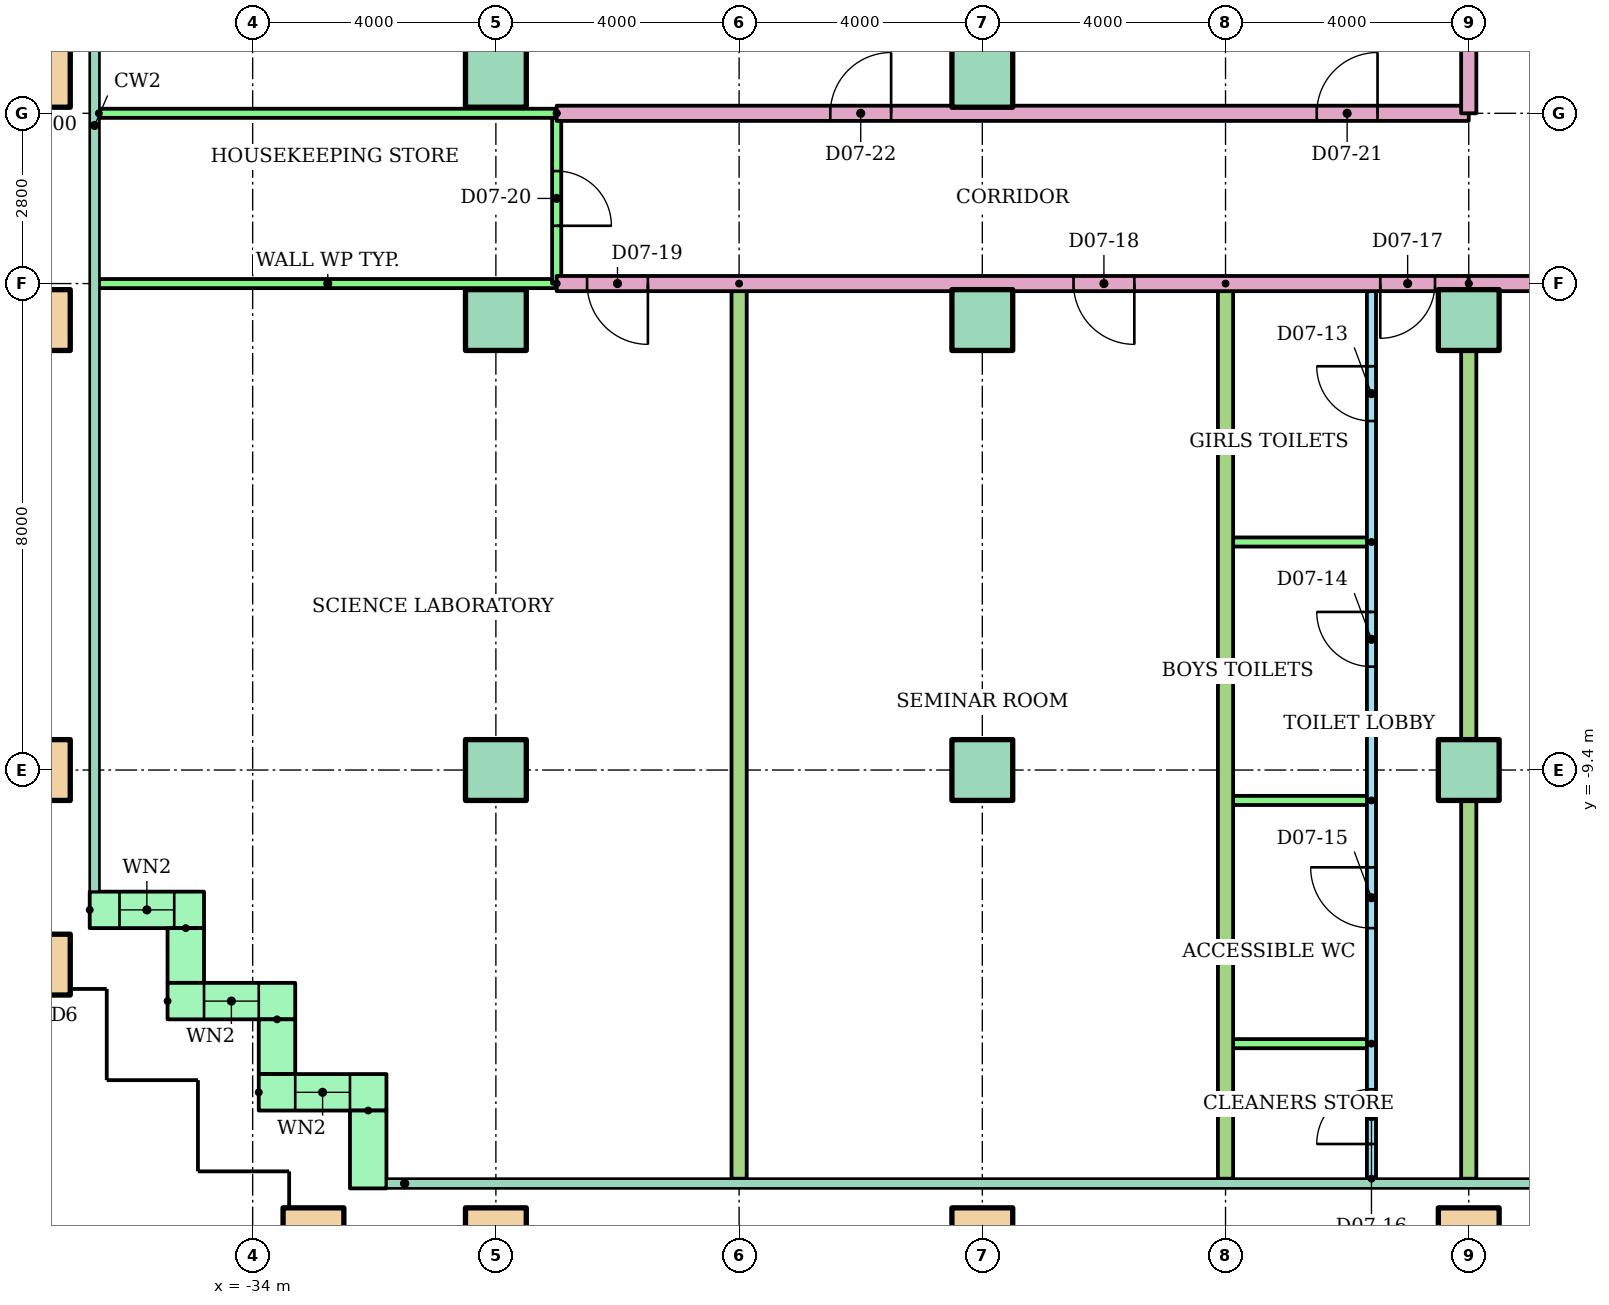
"""IFC4 building model, lengths in metres.
Left out: names, types, materials, properties, quantities, classifications, styles, units other than length and angle.
Written with IfcOpenShell. Run it as: python <this file> out.ifc"""

import sys

from ifc_helpers import new_model, si_unit, direction, frame, frame_2d, origin, origin_2d, place, context, subcontext, project, spatial, rectangle, hollow_rectangle, extrude, element, fill, save


model = new_model("IFC4")
c1 = context("Model", 3, precision=1e-05, world=origin(), true_north=direction((0.0, 1.0)))
c2 = subcontext(c1, "Body", "Model", "MODEL_VIEW")
j1 = project(units=[si_unit("LENGTHUNIT", "METRE"), si_unit("PLANEANGLEUNIT", "RADIAN")], contexts=[c1])
p1 = place(None, origin())
s1 = spatial("IfcSite", under=j1, at=p1, CompositionType="ELEMENT")
p2 = place(p1, origin())
s2 = spatial("IfcBuilding", under=s1, at=p2, CompositionType="ELEMENT")
p3 = place(p2, frame((0.0, 0.0, 29.9)))
s3 = spatial("IfcBuildingStorey", under=s2, at=p3, CompositionType="ELEMENT", Elevation=29.9)
for number, where in (
    (1, (-33.0, -17.1, 0.0)),
    (2, (-30.0, -17.1, 0.0)),
    (3, (-22.0, -17.1, 0.0)),
    (4, (-14.0, -17.1, 0.0)),
    (5, (-37.5, -12.6, 0.0)),
    (6, (-37.5, -9.4, 0.0)),
):
    element("IfcColumn", number, at=place(p3, frame(where)), inside=s3, PredefinedType="COLUMN", context=c2, shape_type="SweptSolid", body=[
        extrude(hollow_rectangle(XDim=1.0, YDim=1.0, WallThickness=0.05, at=origin_2d()), origin(), (0.0, 0.0, 1.0), 3.9),
    ])
for number, where in (
    (7, (-30.0, -9.4, 0.0)),
    (8, (-22.0, -9.4, 0.0)),
    (9, (-14.0, -9.4, 0.0)),
):
    element("IfcColumn", number, at=place(p3, frame(where)), inside=s3, PredefinedType="COLUMN", context=c2, shape_type="SweptSolid", body=[
        extrude(rectangle(XDim=1.0, YDim=1.0, at=origin_2d()), origin(), (0.0, 0.0, 1.0), 3.9),
    ])
p4 = place(p3, frame((-37.5, -2.0, 0.0)))
e10 = element("IfcColumn", 10, at=p4, inside=s3, PredefinedType="COLUMN", context=c2, shape_type="SweptSolid", body=[
    extrude(hollow_rectangle(XDim=1.0, YDim=1.0, WallThickness=0.05, at=origin_2d()), origin(), (0.0, 0.0, 1.0), 3.9),
])
for number, where in (
    (11, (-30.0, -2.0, 0.0)),
    (12, (-22.0, -2.0, 0.0)),
    (13, (-14.0, -2.0, 0.0)),
):
    element("IfcColumn", number, at=place(p3, frame(where)), inside=s3, PredefinedType="COLUMN", context=c2, shape_type="SweptSolid", body=[
        extrude(rectangle(XDim=1.0, YDim=1.0, at=origin_2d()), origin(), (0.0, 0.0, 1.0), 3.9),
    ])
p5 = place(p3, frame((-37.5, 2.0, 0.0)))
e14 = element("IfcColumn", 14, at=p5, inside=s3, PredefinedType="COLUMN", context=c2, shape_type="SweptSolid", body=[
    extrude(hollow_rectangle(XDim=1.0, YDim=1.0, WallThickness=0.05, at=origin_2d()), origin(), (0.0, 0.0, 1.0), 3.9),
])
for number, where in (
    (15, (-30.0, 2.0, 0.0)),
    (16, (-22.0, 2.0, 0.0)),
):
    element("IfcColumn", number, at=place(p3, frame(where)), inside=s3, PredefinedType="COLUMN", context=c2, shape_type="SweptSolid", body=[
        extrude(rectangle(XDim=1.0, YDim=1.0, at=origin_2d()), origin(), (0.0, 0.0, 1.0), 3.9),
    ])
p6 = place(p3, frame((-36.68, -11.7, 0.0)))
e17 = element("IfcWall", 17, at=p6, inside=s3, PredefinedType="STANDARD", context=c2, shape_type="SweptSolid", body=[
    extrude(rectangle(XDim=1.88, YDim=0.6, at=frame_2d((0.94, 0.0))), origin(), (0.0, 0.0, 1.0), 3.6),
])
p7 = place(p6, frame((0.49, 0.0, 0.9)))
e18 = element("IfcOpeningElement", 18, at=p7, cuts=e17, PredefinedType="OPENING", context=c2, shape_type="SweptSolid", body=[
    extrude(rectangle(XDim=0.9, YDim=1.8, at=frame_2d((0.45, 0.9))), frame((0.0, 0.31, 0.0), z_axis=(0.0, -1.0, 0.0), x_axis=(1.0, 0.0, 0.0)), (0.0, 0.0, 1.0), 0.62),
])
p8 = place(p3, frame((-35.1, -12.0, 0.0), z_axis=(0.0, 0.0, 1.0), x_axis=(0.0, -1.0, 0.0)))
e19 = element("IfcWall", 19, at=p8, inside=s3, PredefinedType="STANDARD", context=c2, shape_type="SweptSolid", body=[
    extrude(rectangle(XDim=0.9, YDim=0.6, at=frame_2d((0.45, 0.0))), origin(), (0.0, 0.0, 1.0), 3.6),
])
p9 = place(p3, frame((-35.4, -13.2, 0.0)))
e20 = element("IfcWall", 20, at=p9, inside=s3, PredefinedType="STANDARD", context=c2, shape_type="SweptSolid", body=[
    extrude(rectangle(XDim=2.1, YDim=0.6, at=frame_2d((1.05, 0.0))), origin(), (0.0, 0.0, 1.0), 3.6),
])
p10 = place(p9, frame((0.6, 0.0, 0.9)))
e21 = element("IfcOpeningElement", 21, at=p10, cuts=e20, PredefinedType="OPENING", context=c2, shape_type="SweptSolid", body=[
    extrude(rectangle(XDim=0.9, YDim=1.8, at=frame_2d((0.45, 0.9))), frame((0.0, 0.31, 0.0), z_axis=(0.0, -1.0, 0.0), x_axis=(1.0, 0.0, 0.0)), (0.0, 0.0, 1.0), 0.62),
])
p11 = place(p3, frame((-33.6, -13.5, 0.0), z_axis=(0.0, 0.0, 1.0), x_axis=(0.0, -1.0, 0.0)))
e22 = element("IfcWall", 22, at=p11, inside=s3, PredefinedType="STANDARD", context=c2, shape_type="SweptSolid", body=[
    extrude(rectangle(XDim=0.9, YDim=0.6, at=frame_2d((0.45, 0.0))), origin(), (0.0, 0.0, 1.0), 3.6),
])
p12 = place(p3, frame((-33.9, -14.7, 0.0)))
e23 = element("IfcWall", 23, at=p12, inside=s3, PredefinedType="STANDARD", context=c2, shape_type="SweptSolid", body=[
    extrude(rectangle(XDim=2.1, YDim=0.6, at=frame_2d((1.05, 0.0))), origin(), (0.0, 0.0, 1.0), 3.6),
])
p13 = place(p12, frame((0.6, 0.0, 0.9)))
e24 = element("IfcOpeningElement", 24, at=p13, cuts=e23, PredefinedType="OPENING", context=c2, shape_type="SweptSolid", body=[
    extrude(rectangle(XDim=0.9, YDim=1.8, at=frame_2d((0.45, 0.9))), frame((0.0, 0.31, 0.0), z_axis=(0.0, -1.0, 0.0), x_axis=(1.0, 0.0, 0.0)), (0.0, 0.0, 1.0), 0.62),
])
p14 = place(p3, frame((-32.1, -15.0, 0.0), z_axis=(0.0, 0.0, 1.0), x_axis=(0.0, -1.0, 0.0)))
e25 = element("IfcWall", 25, at=p14, inside=s3, PredefinedType="STANDARD", context=c2, shape_type="SweptSolid", body=[
    extrude(rectangle(XDim=1.28, YDim=0.6, at=frame_2d((0.64, 0.0))), origin(), (0.0, 0.0, 1.0), 3.6),
])
p15 = place(p3, frame((-14.0, -1.4, 0.0), z_axis=(0.0, 0.0, 1.0), x_axis=(-1.0, 0.0, 0.0)))
e26 = element("IfcWall", 26, at=p15, inside=s3, PredefinedType="PARTITIONING", context=c2, shape_type="SweptSolid", body=[
    extrude(rectangle(XDim=15.0, YDim=0.25, at=frame_2d((7.5, 0.0))), origin(), (0.0, 0.0, 1.0), 3.1),
])
p16 = place(p15, frame((0.555, 0.0, 0.0)))
e27 = element("IfcOpeningElement", 27, at=p16, cuts=e26, PredefinedType="OPENING", context=c2, shape_type="SweptSolid", body=[
    extrude(rectangle(XDim=0.9, YDim=2.1, at=frame_2d((0.45, 1.05))), frame((0.0, 0.135, 0.0), z_axis=(0.0, -1.0, 0.0), x_axis=(1.0, 0.0, 0.0)), (0.0, 0.0, 1.0), 0.27),
])
p17 = place(p15, frame((5.5, 0.0, 0.0)))
e28 = element("IfcOpeningElement", 28, at=p17, cuts=e26, PredefinedType="OPENING", context=c2, shape_type="SweptSolid", body=[
    extrude(rectangle(XDim=1.0, YDim=2.1, at=frame_2d((0.5, 1.05))), frame((0.0, 0.135, 0.0), z_axis=(0.0, -1.0, 0.0), x_axis=(1.0, 0.0, 0.0)), (0.0, 0.0, 1.0), 0.27),
])
p18 = place(p15, frame((13.5, 0.0, 0.0)))
e29 = element("IfcOpeningElement", 29, at=p18, cuts=e26, PredefinedType="OPENING", context=c2, shape_type="SweptSolid", body=[
    extrude(rectangle(XDim=1.0, YDim=2.1, at=frame_2d((0.5, 1.05))), frame((0.0, 0.135, 0.0), z_axis=(0.0, -1.0, 0.0), x_axis=(1.0, 0.0, 0.0)), (0.0, 0.0, 1.0), 0.27),
])
p19 = place(p3, frame((-29.0, -1.4, 0.0), z_axis=(0.0, 0.0, 1.0), x_axis=(-1.0, 0.0, 0.0)))
e30 = element("IfcWall", 30, at=p19, inside=s3, PredefinedType="PARTITIONING", context=c2, shape_type="SweptSolid", body=[
    extrude(rectangle(XDim=7.53, YDim=0.15, at=frame_2d((3.765, 0.0))), origin(), (0.0, 0.0, 1.0), 3.1),
])
p20 = place(p3, frame((-29.0, 1.4, 0.0), z_axis=(0.0, 0.0, 1.0), x_axis=(0.0, -1.0, 0.0)))
e31 = element("IfcWall", 31, at=p20, inside=s3, PredefinedType="PARTITIONING", context=c2, shape_type="SweptSolid", body=[
    extrude(rectangle(XDim=2.8, YDim=0.15, at=frame_2d((1.4, 0.0))), origin(), (0.0, 0.0, 1.0), 3.1),
])
p21 = place(p20, frame((0.95, 0.0, 0.0)))
e32 = element("IfcOpeningElement", 32, at=p21, cuts=e31, PredefinedType="OPENING", context=c2, shape_type="SweptSolid", body=[
    extrude(rectangle(XDim=0.9, YDim=2.1, at=frame_2d((0.45, 1.05))), frame((0.0, 0.085, 0.0), z_axis=(0.0, -1.0, 0.0), x_axis=(1.0, 0.0, 0.0)), (0.0, 0.0, 1.0), 0.17),
])
p22 = place(p3, frame((-15.6, -16.121, 0.0), z_axis=(0.0, 0.0, 1.0), x_axis=(0.0, 1.0, 0.0)))
e33 = element("IfcWall", 33, at=p22, inside=s3, PredefinedType="PARTITIONING", context=c2, shape_type="SweptSolid", body=[
    extrude(rectangle(XDim=14.721, YDim=0.15, at=frame_2d((7.361, 0.0))), origin(), (0.0, 0.0, 1.0), 3.1),
])
p23 = place(p22, frame((12.461, 0.0, 0.0)))
e34 = element("IfcOpeningElement", 34, at=p23, cuts=e33, PredefinedType="OPENING", context=c2, shape_type="SweptSolid", body=[
    extrude(rectangle(XDim=0.9, YDim=2.1, at=frame_2d((0.45, 1.05))), frame((0.0, 0.085, 0.0), z_axis=(0.0, -1.0, 0.0), x_axis=(1.0, 0.0, 0.0)), (0.0, 0.0, 1.0), 0.17),
])
p24 = place(p22, frame((8.421, 0.0, 0.0)))
e35 = element("IfcOpeningElement", 35, at=p24, cuts=e33, PredefinedType="OPENING", context=c2, shape_type="SweptSolid", body=[
    extrude(rectangle(XDim=0.9, YDim=2.1, at=frame_2d((0.45, 1.05))), frame((0.0, 0.085, 0.0), z_axis=(0.0, -1.0, 0.0), x_axis=(1.0, 0.0, 0.0)), (0.0, 0.0, 1.0), 0.17),
])
p25 = place(p22, frame((4.121, 0.0, 0.0)))
e36 = element("IfcOpeningElement", 36, at=p25, cuts=e33, PredefinedType="OPENING", context=c2, shape_type="SweptSolid", body=[
    extrude(rectangle(XDim=1.0, YDim=2.1, at=frame_2d((0.5, 1.05))), frame((0.0, 0.085, 0.0), z_axis=(0.0, -1.0, 0.0), x_axis=(1.0, 0.0, 0.0)), (0.0, 0.0, 1.0), 0.17),
])
p26 = place(p22, frame((0.571, 0.0, 0.0)))
e37 = element("IfcOpeningElement", 37, at=p26, cuts=e33, PredefinedType="OPENING", context=c2, shape_type="SweptSolid", body=[
    extrude(rectangle(XDim=0.9, YDim=2.1, at=frame_2d((0.45, 1.05))), frame((0.0, 0.085, 0.0), z_axis=(0.0, -1.0, 0.0), x_axis=(1.0, 0.0, 0.0)), (0.0, 0.0, 1.0), 0.17),
])
for number, where, z_axis, x_axis in (
    (38, (-15.6, -5.65, 0.0), (0.0, 0.0, 1.0), (-1.0, 0.0, 0.0)),
    (39, (-15.6, -9.9, 0.0), (0.0, 0.0, 1.0), (-1.0, 0.0, 0.0)),
    (40, (-15.6, -13.9, 0.0), (0.0, 0.0, 1.0), (-1.0, 0.0, 0.0)),
):
    element("IfcWall", number, at=place(p3, frame(where, z_axis=z_axis, x_axis=x_axis)), inside=s3, PredefinedType="PARTITIONING", context=c2, shape_type="SweptSolid", body=[
        extrude(rectangle(XDim=2.4, YDim=0.15, at=frame_2d((1.2, 0.0))), origin(), (0.0, 0.0, 1.0), 3.1),
    ])
for number, where, z_axis, x_axis in (
    (41, (-26.0, -1.4, 0.0), (0.0, 0.0, 1.0), (0.0, -1.0, 0.0)),
    (42, (-18.0, -1.4, 0.0), (0.0, 0.0, 1.0), (0.0, -1.0, 0.0)),
    (43, (-14.0, -1.4, 0.0), (0.0, 0.0, 1.0), (0.0, -1.0, 0.0)),
):
    element("IfcWall", number, at=place(p3, frame(where, z_axis=z_axis, x_axis=x_axis)), inside=s3, PredefinedType="PARTITIONING", context=c2, shape_type="SweptSolid", body=[
        extrude(rectangle(XDim=14.721, YDim=0.25, at=frame_2d((7.361, 0.0))), origin(), (0.0, 0.0, 1.0), 3.1),
    ])
p27 = place(p3, frame((-29.0, 1.4, 0.0)))
e44 = element("IfcWall", 44, at=p27, inside=s3, PredefinedType="PARTITIONING", context=c2, shape_type="SweptSolid", body=[
    extrude(rectangle(XDim=15.0, YDim=0.25, at=frame_2d((7.5, 0.0))), origin(), (0.0, 0.0, 1.0), 3.1),
])
p28 = place(p27, frame((12.5, 0.0, 0.0)))
e45 = element("IfcOpeningElement", 45, at=p28, cuts=e44, PredefinedType="OPENING", context=c2, shape_type="SweptSolid", body=[
    extrude(rectangle(XDim=1.0, YDim=2.1, at=frame_2d((0.5, 1.05))), frame((0.0, 0.135, 0.0), z_axis=(0.0, -1.0, 0.0), x_axis=(1.0, 0.0, 0.0)), (0.0, 0.0, 1.0), 0.27),
])
p29 = place(p27, frame((4.5, 0.0, 0.0)))
e46 = element("IfcOpeningElement", 46, at=p29, cuts=e44, PredefinedType="OPENING", context=c2, shape_type="SweptSolid", body=[
    extrude(rectangle(XDim=1.0, YDim=2.1, at=frame_2d((0.5, 1.05))), frame((0.0, 0.135, 0.0), z_axis=(0.0, -1.0, 0.0), x_axis=(1.0, 0.0, 0.0)), (0.0, 0.0, 1.0), 0.27),
])
p30 = place(p3, frame((-36.53, 1.4, 0.0)))
e47 = element("IfcWall", 47, at=p30, inside=s3, PredefinedType="PARTITIONING", context=c2, shape_type="SweptSolid", body=[
    extrude(rectangle(XDim=7.53, YDim=0.15, at=frame_2d((3.765, 0.0))), origin(), (0.0, 0.0, 1.0), 3.1),
])
p31 = place(p3, frame((-22.0, 18.521, 0.0), z_axis=(0.0, 0.0, 1.0), x_axis=(0.0, -1.0, 0.0)))
e48 = element("IfcWall", 48, at=p31, inside=s3, PredefinedType="PARTITIONING", context=c2, shape_type="SweptSolid", body=[
    extrude(rectangle(XDim=17.121, YDim=0.25, at=frame_2d((8.561, 0.0))), origin(), (0.0, 0.0, 1.0), 3.1),
])
p32 = place(p3, frame((14.0, -1.4, 0.0), z_axis=(0.0, 0.0, 1.0), x_axis=(-1.0, 0.0, 0.0)))
e49 = element("IfcWall", 49, at=p32, inside=s3, PredefinedType="PARTITIONING", context=c2, shape_type="SweptSolid", body=[
    extrude(rectangle(XDim=28.0, YDim=0.25, at=frame_2d((14.0, 0.0))), origin(), (0.0, 0.0, 1.0), 3.1),
])
p33 = place(p32, frame((25.5, 0.0, 0.0)))
e50 = element("IfcOpeningElement", 50, at=p33, cuts=e49, PredefinedType="OPENING", context=c2, shape_type="SweptSolid", body=[
    extrude(rectangle(XDim=1.0, YDim=2.1, at=frame_2d((0.5, 1.05))), frame((0.0, 0.135, 0.0), z_axis=(0.0, -1.0, 0.0), x_axis=(1.0, 0.0, 0.0)), (0.0, 0.0, 1.0), 0.27),
])
p34 = place(p32, frame((1.5, 0.0, 0.0)))
e51 = element("IfcOpeningElement", 51, at=p34, cuts=e49, PredefinedType="OPENING", context=c2, shape_type="SweptSolid", body=[
    extrude(rectangle(XDim=1.0, YDim=2.1, at=frame_2d((0.5, 1.05))), frame((0.0, 0.135, 0.0), z_axis=(0.0, -1.0, 0.0), x_axis=(1.0, 0.0, 0.0)), (0.0, 0.0, 1.0), 0.27),
])
p35 = place(p3, frame((-14.0, 3.0, 0.0), z_axis=(0.0, 0.0, 1.0), x_axis=(0.0, -1.0, 0.0)))
e52 = element("IfcWall", 52, at=p35, inside=s3, PredefinedType="PARTITIONING", context=c2, shape_type="SweptSolid", body=[
    extrude(rectangle(XDim=1.6, YDim=0.25, at=frame_2d((0.8, 0.0))), origin(), (0.0, 0.0, 1.0), 3.1),
])
p36 = place(p7, origin())
e53 = element("IfcWindow", 53, at=p36, inside=s3, PartitioningType="SINGLE_PANEL", PredefinedType="WINDOW", context=c2, shape_type="SweptSolid", body=[
    extrude(rectangle(XDim=0.9, YDim=1.8, at=frame_2d((0.45, 0.9))), frame((0.0, 0.03, 0.0), z_axis=(0.0, -1.0, 0.0), x_axis=(1.0, 0.0, 0.0)), (0.0, 0.0, 1.0), 0.06),
])
fill(e18, e53)
p37 = place(p10, origin())
e54 = element("IfcWindow", 54, at=p37, inside=s3, PartitioningType="SINGLE_PANEL", PredefinedType="WINDOW", context=c2, shape_type="SweptSolid", body=[
    extrude(rectangle(XDim=0.9, YDim=1.8, at=frame_2d((0.45, 0.9))), frame((0.0, 0.03, 0.0), z_axis=(0.0, -1.0, 0.0), x_axis=(1.0, 0.0, 0.0)), (0.0, 0.0, 1.0), 0.06),
])
fill(e21, e54)
p38 = place(p13, origin())
e55 = element("IfcWindow", 55, at=p38, inside=s3, PartitioningType="SINGLE_PANEL", PredefinedType="WINDOW", context=c2, shape_type="SweptSolid", body=[
    extrude(rectangle(XDim=0.9, YDim=1.8, at=frame_2d((0.45, 0.9))), frame((0.0, 0.03, 0.0), z_axis=(0.0, -1.0, 0.0), x_axis=(1.0, 0.0, 0.0)), (0.0, 0.0, 1.0), 0.06),
])
fill(e24, e55)
p39 = place(p23, origin())
e56 = element("IfcDoor", 56, at=p39, inside=s3, OperationType="SINGLE_SWING_RIGHT", PredefinedType="DOOR", context=c2, shape_type="SweptSolid", body=[
    extrude(rectangle(XDim=0.9, YDim=2.1, at=frame_2d((0.45, 1.05))), frame((0.0, 0.025, 0.0), z_axis=(0.0, -1.0, 0.0), x_axis=(1.0, 0.0, 0.0)), (0.0, 0.0, 1.0), 0.05),
])
fill(e34, e56)
p40 = place(p24, origin())
e57 = element("IfcDoor", 57, at=p40, inside=s3, OperationType="SINGLE_SWING_RIGHT", PredefinedType="DOOR", context=c2, shape_type="SweptSolid", body=[
    extrude(rectangle(XDim=0.9, YDim=2.1, at=frame_2d((0.45, 1.05))), frame((0.0, 0.025, 0.0), z_axis=(0.0, -1.0, 0.0), x_axis=(1.0, 0.0, 0.0)), (0.0, 0.0, 1.0), 0.05),
])
fill(e35, e57)
p41 = place(p25, origin())
e58 = element("IfcDoor", 58, at=p41, inside=s3, OperationType="SINGLE_SWING_RIGHT", PredefinedType="DOOR", context=c2, shape_type="SweptSolid", body=[
    extrude(rectangle(XDim=1.0, YDim=2.1, at=frame_2d((0.5, 1.05))), frame((0.0, 0.025, 0.0), z_axis=(0.0, -1.0, 0.0), x_axis=(1.0, 0.0, 0.0)), (0.0, 0.0, 1.0), 0.05),
])
fill(e36, e58)
p42 = place(p26, origin())
e59 = element("IfcDoor", 59, at=p42, inside=s3, OperationType="SINGLE_SWING_LEFT", PredefinedType="DOOR", context=c2, shape_type="SweptSolid", body=[
    extrude(rectangle(XDim=0.9, YDim=2.1, at=frame_2d((0.45, 1.05))), frame((0.0, 0.025, 0.0), z_axis=(0.0, -1.0, 0.0), x_axis=(1.0, 0.0, 0.0)), (0.0, 0.0, 1.0), 0.05),
])
fill(e37, e59)
p43 = place(p16, origin())
e60 = element("IfcDoor", 60, at=p43, inside=s3, OperationType="SINGLE_SWING_RIGHT", PredefinedType="DOOR", context=c2, shape_type="SweptSolid", body=[
    extrude(rectangle(XDim=0.9, YDim=2.1, at=frame_2d((0.45, 1.05))), frame((0.0, 0.025, 0.0), z_axis=(0.0, -1.0, 0.0), x_axis=(1.0, 0.0, 0.0)), (0.0, 0.0, 1.0), 0.05),
])
fill(e27, e60)
p44 = place(p17, origin())
e61 = element("IfcDoor", 61, at=p44, inside=s3, OperationType="SINGLE_SWING_LEFT", PredefinedType="DOOR", context=c2, shape_type="SweptSolid", body=[
    extrude(rectangle(XDim=1.0, YDim=2.1, at=frame_2d((0.5, 1.05))), frame((0.0, 0.025, 0.0), z_axis=(0.0, -1.0, 0.0), x_axis=(1.0, 0.0, 0.0)), (0.0, 0.0, 1.0), 0.05),
])
fill(e28, e61)
p45 = place(p18, origin())
e62 = element("IfcDoor", 62, at=p45, inside=s3, OperationType="SINGLE_SWING_LEFT", PredefinedType="DOOR", context=c2, shape_type="SweptSolid", body=[
    extrude(rectangle(XDim=1.0, YDim=2.1, at=frame_2d((0.5, 1.05))), frame((0.0, 0.025, 0.0), z_axis=(0.0, -1.0, 0.0), x_axis=(1.0, 0.0, 0.0)), (0.0, 0.0, 1.0), 0.05),
])
fill(e29, e62)
p46 = place(p21, origin())
e63 = element("IfcDoor", 63, at=p46, inside=s3, OperationType="SINGLE_SWING_RIGHT", PredefinedType="DOOR", context=c2, shape_type="SweptSolid", body=[
    extrude(rectangle(XDim=0.9, YDim=2.1, at=frame_2d((0.45, 1.05))), frame((0.0, 0.025, 0.0), z_axis=(0.0, -1.0, 0.0), x_axis=(1.0, 0.0, 0.0)), (0.0, 0.0, 1.0), 0.05),
])
fill(e32, e63)
p47 = place(p28, origin())
e64 = element("IfcDoor", 64, at=p47, inside=s3, OperationType="SINGLE_SWING_RIGHT", PredefinedType="DOOR", context=c2, shape_type="SweptSolid", body=[
    extrude(rectangle(XDim=1.0, YDim=2.1, at=frame_2d((0.5, 1.05))), frame((0.0, 0.025, 0.0), z_axis=(0.0, -1.0, 0.0), x_axis=(1.0, 0.0, 0.0)), (0.0, 0.0, 1.0), 0.05),
])
fill(e45, e64)
p48 = place(p29, origin())
e65 = element("IfcDoor", 65, at=p48, inside=s3, OperationType="SINGLE_SWING_RIGHT", PredefinedType="DOOR", context=c2, shape_type="SweptSolid", body=[
    extrude(rectangle(XDim=1.0, YDim=2.1, at=frame_2d((0.5, 1.05))), frame((0.0, 0.025, 0.0), z_axis=(0.0, -1.0, 0.0), x_axis=(1.0, 0.0, 0.0)), (0.0, 0.0, 1.0), 0.05),
])
fill(e46, e65)
save(model, sys.argv[1])
